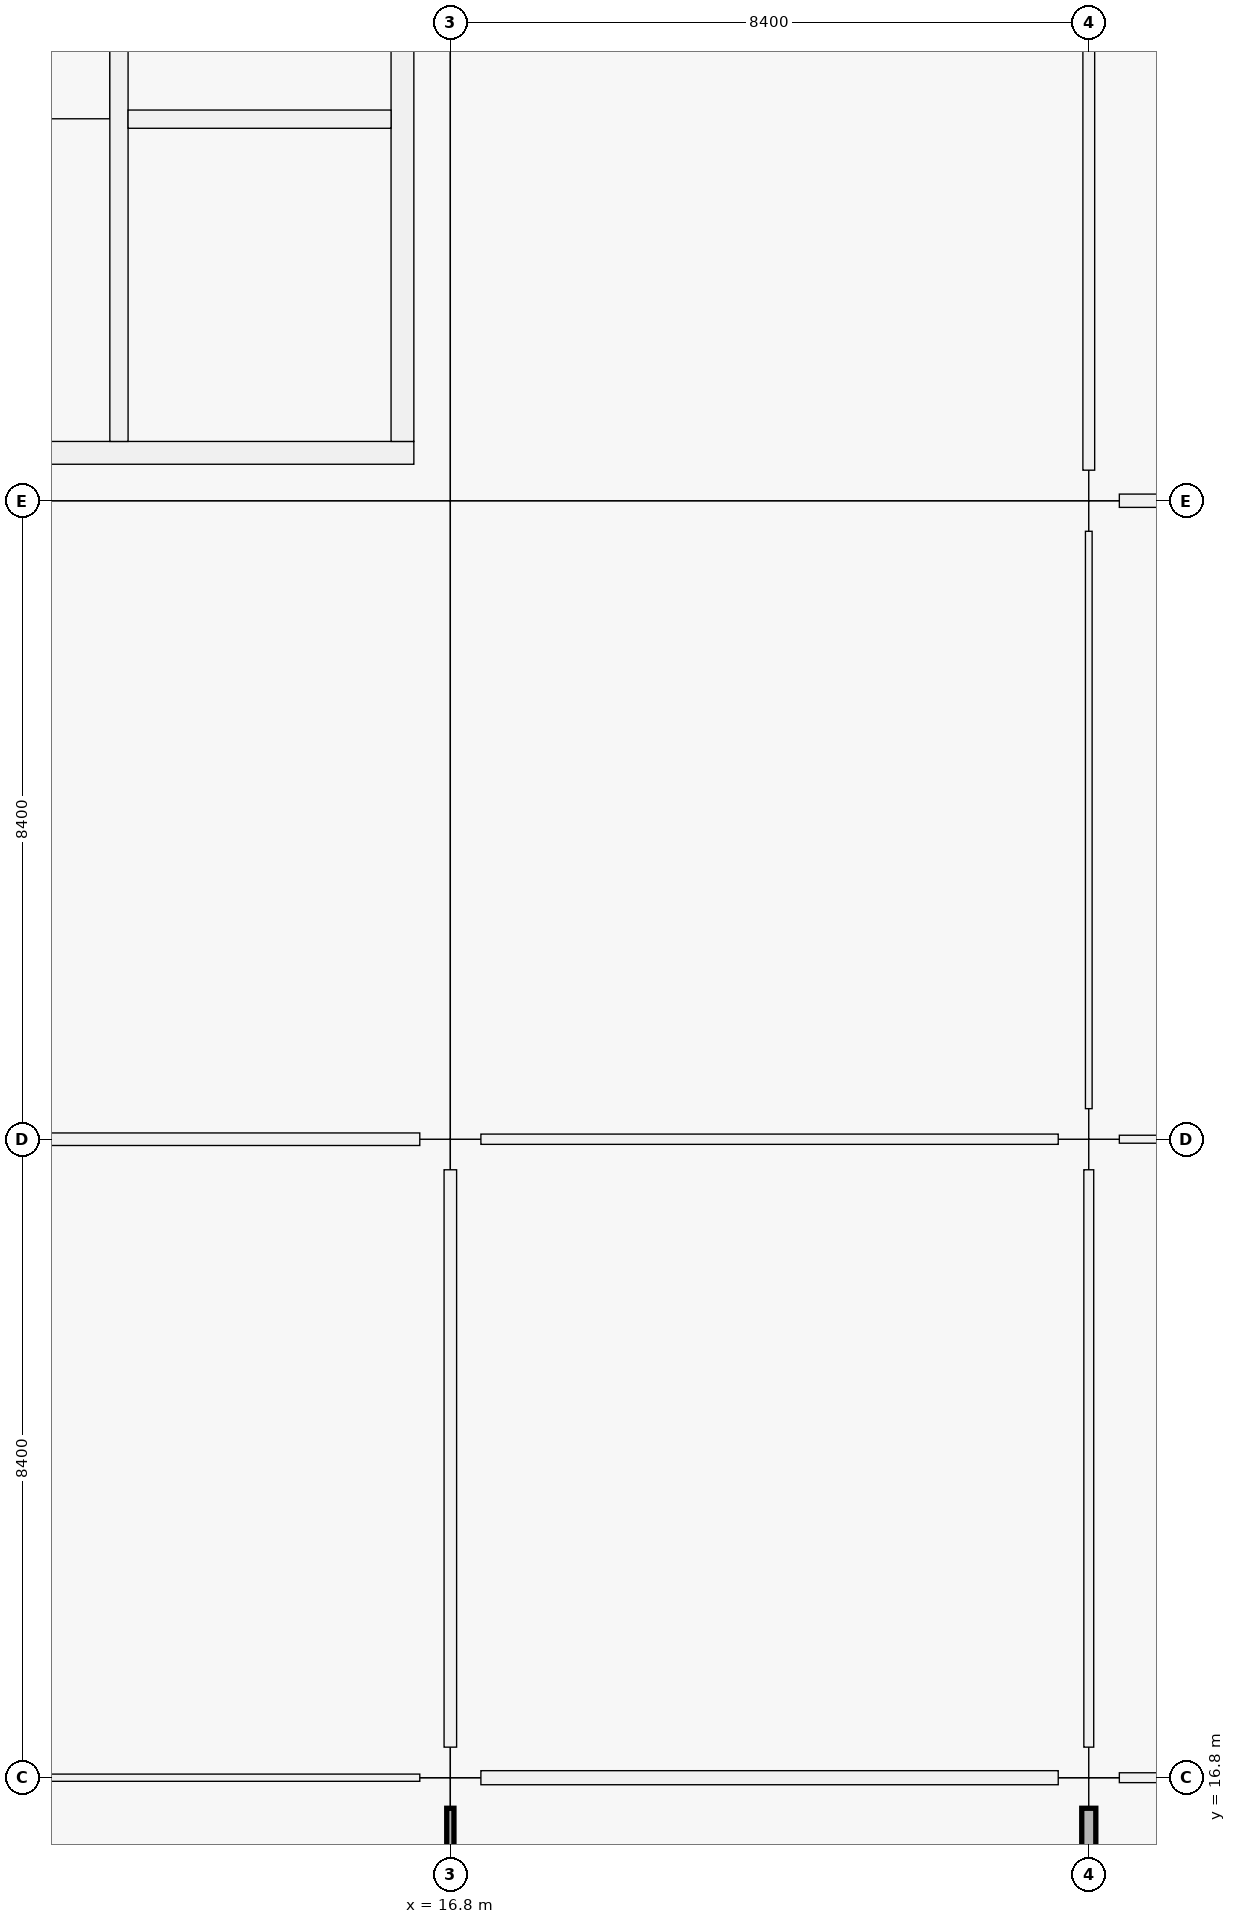
"""IFC4 building model, lengths in metres.
Left out: names, types, materials, properties, quantities, classifications, styles, units other than length and angle.
Written with IfcOpenShell. Run it as: python <this file> out.ifc"""

import sys

from ifc_helpers import new_model, si_unit, direction, frame, frame_2d, origin, origin_2d, place, context, subcontext, project, spatial, rectangle, extrude, element, fill, save


model = new_model("IFC4")
c1 = context("Model", 3, precision=1e-05, world=origin(), true_north=direction((0.0, 1.0)))
c2 = subcontext(c1, "Body", "Model", "MODEL_VIEW")
j1 = project(units=[si_unit("LENGTHUNIT", "METRE"), si_unit("PLANEANGLEUNIT", "RADIAN")], contexts=[c1])
p1 = place(None, origin())
s1 = spatial("IfcSite", under=j1, at=p1, CompositionType="ELEMENT")
p2 = place(p1, origin())
s2 = spatial("IfcBuilding", under=s1, at=p2, CompositionType="ELEMENT")
p3 = place(p2, frame((0.0, 0.0, 5.76)))
s3 = spatial("IfcBuildingStorey", under=s2, at=p3, CompositionType="ELEMENT", Elevation=5.76)
for number, where, z_axis, x_axis in (
    (1, (16.8, 16.8, 0.0), (0.0, 0.0, 1.0), (1.0, 0.0, 0.0)),
    (2, (16.8, 25.2, 0.0), (0.0, 0.0, 1.0), (1.0, 0.0, 0.0)),
    (3, (16.8, 33.6, 0.0), (0.0, 0.0, 1.0), (1.0, 0.0, 0.0)),
    (4, (25.2, 16.8, 0.0), (0.0, 0.0, 1.0), (1.0, 0.0, 0.0)),
    (5, (25.2, 25.2, 0.0), (0.0, 0.0, 1.0), (1.0, 0.0, 0.0)),
    (6, (25.2, 33.6, 0.0), (0.0, 0.0, 1.0), (1.0, 0.0, 0.0)),
):
    element("IfcColumn", number, at=place(p3, frame(where, z_axis=z_axis, x_axis=x_axis)), inside=s3, PredefinedType="COLUMN", context=c2, shape_type="SweptSolid", body=[
        extrude(rectangle(XDim=0.8, YDim=0.8, at=origin_2d()), origin(), (0.0, 0.0, 1.0), 4.5),
    ])
p4 = place(p3, frame((16.32, 34.23, 0.0), z_axis=(0.0, 0.0, 1.0), x_axis=(-1.0, 0.0, 0.0)))
e7 = element("IfcWall", 7, at=p4, inside=s3, PredefinedType="SHEAR", context=c2, shape_type="SweptSolid", body=[
    extrude(rectangle(XDim=7.44, YDim=0.3, at=frame_2d((3.72, 0.0))), origin(), (0.0, 0.0, 1.0), 4.5),
])
p5 = place(p4, frame((1.28, 0.0, 0.0)))
e8 = element("IfcOpeningElement", 8, at=p5, cuts=e7, PredefinedType="OPENING", context=c2, shape_type="SweptSolid", body=[
    extrude(rectangle(XDim=1.5, YDim=2.15, at=frame_2d((0.75, 1.075))), frame((0.0, 0.15, 0.0), z_axis=(0.0, -1.0, 0.0), x_axis=(1.0, 0.0, 0.0)), (0.0, 0.0, 1.0), 0.3),
])
p6 = place(p3, frame((16.17, 41.22, 0.0), z_axis=(0.0, 0.0, 1.0), x_axis=(0.0, -1.0, 0.0)))
e9 = element("IfcWall", 9, at=p6, inside=s3, PredefinedType="SHEAR", context=c2, shape_type="SweptSolid", body=[
    extrude(rectangle(XDim=6.84, YDim=0.3, at=frame_2d((3.42, 0.0))), origin(), (0.0, 0.0, 1.0), 4.5),
])
p7 = place(p3, frame((12.44, 34.38, 0.0), z_axis=(0.0, 0.0, 1.0), x_axis=(0.0, 1.0, 0.0)))
e10 = element("IfcWall", 10, at=p7, inside=s3, PredefinedType="SHEAR", context=c2, shape_type="SweptSolid", body=[
    extrude(rectangle(XDim=6.84, YDim=0.24, at=frame_2d((3.42, 0.0))), origin(), (0.0, 0.0, 1.0), 4.5),
])
p8 = place(p7, frame((0.12, 0.0, 0.0)))
e11 = element("IfcOpeningElement", 11, at=p8, cuts=e10, PredefinedType="OPENING", context=c2, shape_type="SweptSolid", body=[
    extrude(rectangle(XDim=1.0, YDim=2.15, at=frame_2d((0.5, 1.075))), frame((0.0, 0.12, 0.0), z_axis=(0.0, -1.0, 0.0), x_axis=(1.0, 0.0, 0.0)), (0.0, 0.0, 1.0), 0.24),
])
p9 = place(p3, frame((12.56, 38.62, 0.0), z_axis=(0.0, 0.0, 1.0), x_axis=(1.0, 0.0, 0.0)))
e12 = element("IfcWall", 12, at=p9, inside=s3, PredefinedType="SHEAR", context=c2, shape_type="SweptSolid", body=[
    extrude(rectangle(XDim=3.46, YDim=0.24, at=frame_2d((1.73, 0.0))), origin(), (0.0, 0.0, 1.0), 4.5),
])
p10 = place(p9, frame((1.18, 0.0, 0.0)))
e13 = element("IfcOpeningElement", 13, at=p10, cuts=e12, PredefinedType="OPENING", context=c2, shape_type="SweptSolid", body=[
    extrude(rectangle(XDim=1.1, YDim=2.15, at=frame_2d((0.55, 1.075))), frame((0.0, 0.12, 0.0), z_axis=(0.0, -1.0, 0.0), x_axis=(1.0, 0.0, 0.0)), (0.0, 0.0, 1.0), 0.24),
])
p11 = place(p3, frame((8.802, 16.8, 0.0), z_axis=(0.0, 0.0, 1.0), x_axis=(1.0, 0.0, 0.0)))
e14 = element("IfcWall", 14, at=p11, inside=s3, PredefinedType="PARTITIONING", context=c2, shape_type="SweptSolid", body=[
    extrude(rectangle(XDim=7.596, YDim=0.095, at=frame_2d((3.798, 0.0))), origin(), (0.0, 0.0, 1.0), 2.4),
])
p12 = place(p11, frame((3.258, 0.0, 0.0)))
e15 = element("IfcOpeningElement", 15, at=p12, cuts=e14, PredefinedType="OPENING", context=c2, shape_type="SweptSolid", body=[
    extrude(rectangle(XDim=1.08, YDim=2.22, at=frame_2d((0.54, 1.11))), frame((0.0, 0.047, 0.0), z_axis=(0.0, -1.0, 0.0), x_axis=(1.0, 0.0, 0.0)), (0.0, 0.0, 1.0), 0.095),
])
p13 = place(p3, frame((8.802, 25.2, 0.0), z_axis=(0.0, 0.0, 1.0), x_axis=(1.0, 0.0, 0.0)))
e16 = element("IfcWall", 16, at=p13, inside=s3, PredefinedType="PARTITIONING", context=c2, shape_type="SweptSolid", body=[
    extrude(rectangle(XDim=7.596, YDim=0.165, at=frame_2d((3.798, 0.0))), origin(), (0.0, 0.0, 1.0), 2.4),
])
p14 = place(p13, frame((3.318, 0.0, 0.0)))
e17 = element("IfcOpeningElement", 17, at=p14, cuts=e16, PredefinedType="OPENING", context=c2, shape_type="SweptSolid", body=[
    extrude(rectangle(XDim=0.96, YDim=2.18, at=frame_2d((0.48, 1.09))), frame((0.0, 0.083, 0.0), z_axis=(0.0, -1.0, 0.0), x_axis=(1.0, 0.0, 0.0)), (0.0, 0.0, 1.0), 0.165),
])
p15 = place(p3, frame((17.202, 16.8, 0.0), z_axis=(0.0, 0.0, 1.0), x_axis=(1.0, 0.0, 0.0)))
e18 = element("IfcWall", 18, at=p15, inside=s3, PredefinedType="PARTITIONING", context=c2, shape_type="SweptSolid", body=[
    extrude(rectangle(XDim=7.596, YDim=0.185, at=frame_2d((3.798, 0.0))), origin(), (0.0, 0.0, 1.0), 2.4),
])
p16 = place(p15, frame((3.268, 0.0, 0.0)))
e19 = element("IfcOpeningElement", 19, at=p16, cuts=e18, PredefinedType="OPENING", context=c2, shape_type="SweptSolid", body=[
    extrude(rectangle(XDim=1.06, YDim=2.22, at=frame_2d((0.53, 1.11))), frame((0.0, 0.093, 0.0), z_axis=(0.0, -1.0, 0.0), x_axis=(1.0, 0.0, 0.0)), (0.0, 0.0, 1.0), 0.185),
])
p17 = place(p3, frame((17.202, 25.2, 0.0), z_axis=(0.0, 0.0, 1.0), x_axis=(1.0, 0.0, 0.0)))
e20 = element("IfcWall", 20, at=p17, inside=s3, PredefinedType="PARTITIONING", context=c2, shape_type="SweptSolid", body=[
    extrude(rectangle(XDim=7.596, YDim=0.135, at=frame_2d((3.798, 0.0))), origin(), (0.0, 0.0, 1.0), 2.4),
])
p18 = place(p17, frame((3.338, 0.0, 0.0)))
e21 = element("IfcOpeningElement", 21, at=p18, cuts=e20, PredefinedType="OPENING", context=c2, shape_type="SweptSolid", body=[
    extrude(rectangle(XDim=0.92, YDim=2.15, at=frame_2d((0.46, 1.075))), frame((0.0, 0.067, 0.0), z_axis=(0.0, -1.0, 0.0), x_axis=(1.0, 0.0, 0.0)), (0.0, 0.0, 1.0), 0.135),
])
p19 = place(p3, frame((25.602, 16.8, 0.0), z_axis=(0.0, 0.0, 1.0), x_axis=(1.0, 0.0, 0.0)))
e22 = element("IfcWall", 22, at=p19, inside=s3, PredefinedType="MOVABLE", context=c2, shape_type="SweptSolid", body=[
    extrude(rectangle(XDim=7.596, YDim=0.13, at=frame_2d((3.798, 0.0))), origin(), (0.0, 0.0, 1.0), 2.4),
])
p20 = place(p19, frame((3.313, 0.0, 0.0)))
e23 = element("IfcOpeningElement", 23, at=p20, cuts=e22, PredefinedType="OPENING", context=c2, shape_type="SweptSolid", body=[
    extrude(rectangle(XDim=0.97, YDim=2.12, at=frame_2d((0.485, 1.06))), frame((0.0, 0.065, 0.0), z_axis=(0.0, -1.0, 0.0), x_axis=(1.0, 0.0, 0.0)), (0.0, 0.0, 1.0), 0.13),
])
p21 = place(p3, frame((25.602, 25.2, 0.0), z_axis=(0.0, 0.0, 1.0), x_axis=(1.0, 0.0, 0.0)))
e24 = element("IfcWall", 24, at=p21, inside=s3, PredefinedType="PARTITIONING", context=c2, shape_type="SweptSolid", body=[
    extrude(rectangle(XDim=7.596, YDim=0.105, at=frame_2d((3.798, 0.0))), origin(), (0.0, 0.0, 1.0), 2.4),
])
p22 = place(p21, frame((3.278, 0.0, 0.0)))
e25 = element("IfcOpeningElement", 25, at=p22, cuts=e24, PredefinedType="OPENING", context=c2, shape_type="SweptSolid", body=[
    extrude(rectangle(XDim=1.04, YDim=2.2, at=frame_2d((0.52, 1.1))), frame((0.0, 0.052, 0.0), z_axis=(0.0, -1.0, 0.0), x_axis=(1.0, 0.0, 0.0)), (0.0, 0.0, 1.0), 0.105),
])
p23 = place(p3, frame((25.602, 33.6, 0.0), z_axis=(0.0, 0.0, 1.0), x_axis=(1.0, 0.0, 0.0)))
e26 = element("IfcWall", 26, at=p23, inside=s3, PredefinedType="PARTITIONING", context=c2, shape_type="SweptSolid", body=[
    extrude(rectangle(XDim=7.596, YDim=0.175, at=frame_2d((3.798, 0.0))), origin(), (0.0, 0.0, 1.0), 2.4),
])
p24 = place(p23, frame((3.333, 0.0, 0.0)))
e27 = element("IfcOpeningElement", 27, at=p24, cuts=e26, PredefinedType="OPENING", context=c2, shape_type="SweptSolid", body=[
    extrude(rectangle(XDim=0.93, YDim=2.12, at=frame_2d((0.465, 1.06))), frame((0.0, 0.087, 0.0), z_axis=(0.0, -1.0, 0.0), x_axis=(1.0, 0.0, 0.0)), (0.0, 0.0, 1.0), 0.175),
])
p25 = place(p3, frame((16.8, 8.702, 0.0), z_axis=(0.0, 0.0, 1.0), x_axis=(0.0, 1.0, 0.0)))
e28 = element("IfcWall", 28, at=p25, inside=s3, PredefinedType="PARTITIONING", context=c2, shape_type="SweptSolid", body=[
    extrude(rectangle(XDim=7.696, YDim=0.095, at=frame_2d((3.848, 0.0))), origin(), (0.0, 0.0, 1.0), 2.4),
])
p26 = place(p25, frame((3.323, 0.0, 0.0)))
e29 = element("IfcOpeningElement", 29, at=p26, cuts=e28, PredefinedType="OPENING", context=c2, shape_type="SweptSolid", body=[
    extrude(rectangle(XDim=1.05, YDim=2.12, at=frame_2d((0.525, 1.06))), frame((0.0, 0.047, 0.0), z_axis=(0.0, -1.0, 0.0), x_axis=(1.0, 0.0, 0.0)), (0.0, 0.0, 1.0), 0.095),
])
p27 = place(p3, frame((16.8, 17.202, 0.0), z_axis=(0.0, 0.0, 1.0), x_axis=(0.0, 1.0, 0.0)))
e30 = element("IfcWall", 30, at=p27, inside=s3, PredefinedType="PARTITIONING", context=c2, shape_type="SweptSolid", body=[
    extrude(rectangle(XDim=7.596, YDim=0.165, at=frame_2d((3.798, 0.0))), origin(), (0.0, 0.0, 1.0), 2.4),
])
p28 = place(p27, frame((3.293, 0.0, 0.0)))
e31 = element("IfcOpeningElement", 31, at=p28, cuts=e30, PredefinedType="OPENING", context=c2, shape_type="SweptSolid", body=[
    extrude(rectangle(XDim=1.01, YDim=2.12, at=frame_2d((0.505, 1.06))), frame((0.0, 0.083, 0.0), z_axis=(0.0, -1.0, 0.0), x_axis=(1.0, 0.0, 0.0)), (0.0, 0.0, 1.0), 0.165),
])
p29 = place(p3, frame((25.2, 8.727, 0.0), z_axis=(0.0, 0.0, 1.0), x_axis=(0.0, 1.0, 0.0)))
e32 = element("IfcWall", 32, at=p29, inside=s3, PredefinedType="PARTITIONING", context=c2, shape_type="SweptSolid", body=[
    extrude(rectangle(XDim=7.671, YDim=0.185, at=frame_2d((3.835, 0.0))), origin(), (0.0, 0.0, 1.0), 2.4),
])
p30 = place(p29, frame((3.306, 0.0, 0.0)))
e33 = element("IfcOpeningElement", 33, at=p30, cuts=e32, PredefinedType="OPENING", context=c2, shape_type="SweptSolid", body=[
    extrude(rectangle(XDim=1.06, YDim=2.22, at=frame_2d((0.53, 1.11))), frame((0.0, 0.093, 0.0), z_axis=(0.0, -1.0, 0.0), x_axis=(1.0, 0.0, 0.0)), (0.0, 0.0, 1.0), 0.185),
])
p31 = place(p3, frame((25.2, 17.202, 0.0), z_axis=(0.0, 0.0, 1.0), x_axis=(0.0, 1.0, 0.0)))
e34 = element("IfcWall", 34, at=p31, inside=s3, PredefinedType="MOVABLE", context=c2, shape_type="SweptSolid", body=[
    extrude(rectangle(XDim=7.596, YDim=0.13, at=frame_2d((3.798, 0.0))), origin(), (0.0, 0.0, 1.0), 2.4),
])
p32 = place(p31, frame((3.278, 0.0, 0.0)))
e35 = element("IfcOpeningElement", 35, at=p32, cuts=e34, PredefinedType="OPENING", context=c2, shape_type="SweptSolid", body=[
    extrude(rectangle(XDim=1.04, YDim=2.2, at=frame_2d((0.52, 1.1))), frame((0.0, 0.065, 0.0), z_axis=(0.0, -1.0, 0.0), x_axis=(1.0, 0.0, 0.0)), (0.0, 0.0, 1.0), 0.13),
])
p33 = place(p3, frame((25.2, 25.602, 0.0), z_axis=(0.0, 0.0, 1.0), x_axis=(0.0, 1.0, 0.0)))
e36 = element("IfcWall", 36, at=p33, inside=s3, PredefinedType="PARTITIONING", context=c2, shape_type="SweptSolid", body=[
    extrude(rectangle(XDim=7.596, YDim=0.088, at=frame_2d((3.798, 0.0))), origin(), (0.0, 0.0, 1.0), 2.4),
])
p34 = place(p33, frame((3.268, 0.0, 0.0)))
e37 = element("IfcOpeningElement", 37, at=p34, cuts=e36, PredefinedType="OPENING", context=c2, shape_type="SweptSolid", body=[
    extrude(rectangle(XDim=1.06, YDim=2.22, at=frame_2d((0.53, 1.11))), frame((0.0, 0.044, 0.0), z_axis=(0.0, -1.0, 0.0), x_axis=(1.0, 0.0, 0.0)), (0.0, 0.0, 1.0), 0.088),
])
p35 = place(p3, frame((25.2, 34.002, 0.0), z_axis=(0.0, 0.0, 1.0), x_axis=(0.0, 1.0, 0.0)))
e38 = element("IfcWall", 38, at=p35, inside=s3, PredefinedType="PARTITIONING", context=c2, shape_type="SweptSolid", body=[
    extrude(rectangle(XDim=7.596, YDim=0.155, at=frame_2d((3.798, 0.0))), origin(), (0.0, 0.0, 1.0), 2.4),
])
p36 = place(p35, frame((3.278, 0.0, 0.0)))
e39 = element("IfcOpeningElement", 39, at=p36, cuts=e38, PredefinedType="OPENING", context=c2, shape_type="SweptSolid", body=[
    extrude(rectangle(XDim=1.04, YDim=2.2, at=frame_2d((0.52, 1.1))), frame((0.0, 0.078, 0.0), z_axis=(0.0, -1.0, 0.0), x_axis=(1.0, 0.0, 0.0)), (0.0, 0.0, 1.0), 0.155),
])
p37 = place(p8, origin())
e40 = element("IfcDoor", 40, at=p37, inside=s3, OperationType="SINGLE_SWING_RIGHT", PredefinedType="DOOR", context=c2, shape_type="SweptSolid", body=[
    extrude(rectangle(XDim=1.0, YDim=2.15, at=frame_2d((0.5, 1.075))), frame((0.0, 0.025, 0.0), z_axis=(0.0, -1.0, 0.0), x_axis=(1.0, 0.0, 0.0)), (0.0, 0.0, 1.0), 0.05),
])
fill(e11, e40)
p38 = place(p5, origin())
e41 = element("IfcDoor", 41, at=p38, inside=s3, OperationType="DOUBLE_DOOR_SINGLE_SWING", PredefinedType="DOOR", context=c2, shape_type="SweptSolid", body=[
    extrude(rectangle(XDim=1.5, YDim=2.15, at=frame_2d((0.75, 1.075))), frame((0.0, 0.025, 0.0), z_axis=(0.0, -1.0, 0.0), x_axis=(1.0, 0.0, 0.0)), (0.0, 0.0, 1.0), 0.05),
])
fill(e8, e41)
p39 = place(p10, origin())
e42 = element("IfcDoor", 42, at=p39, inside=s3, OperationType="DOUBLE_DOOR_SLIDING", PredefinedType="DOOR", context=c2, shape_type="SweptSolid", body=[
    extrude(rectangle(XDim=1.1, YDim=2.15, at=frame_2d((0.55, 1.075))), frame((0.0, 0.025, 0.0), z_axis=(0.0, -1.0, 0.0), x_axis=(1.0, 0.0, 0.0)), (0.0, 0.0, 1.0), 0.05),
])
fill(e13, e42)
p40 = place(p14, origin())
e43 = element("IfcDoor", 43, at=p40, inside=s3, OperationType="SINGLE_SWING_RIGHT", PredefinedType="DOOR", context=c2, shape_type="SweptSolid", body=[
    extrude(rectangle(XDim=0.96, YDim=2.18, at=frame_2d((0.48, 1.09))), frame((0.0, 0.025, 0.0), z_axis=(0.0, -1.0, 0.0), x_axis=(1.0, 0.0, 0.0)), (0.0, 0.0, 1.0), 0.05),
])
fill(e17, e43)
p41 = place(p18, origin())
e44 = element("IfcDoor", 44, at=p41, inside=s3, OperationType="SINGLE_SWING_RIGHT", PredefinedType="DOOR", context=c2, shape_type="SweptSolid", body=[
    extrude(rectangle(XDim=0.92, YDim=2.15, at=frame_2d((0.46, 1.075))), frame((0.0, 0.025, 0.0), z_axis=(0.0, -1.0, 0.0), x_axis=(1.0, 0.0, 0.0)), (0.0, 0.0, 1.0), 0.05),
])
fill(e21, e44)
p42 = place(p34, origin())
e45 = element("IfcDoor", 45, at=p42, inside=s3, OperationType="SINGLE_SWING_LEFT", PredefinedType="DOOR", context=c2, shape_type="SweptSolid", body=[
    extrude(rectangle(XDim=1.06, YDim=2.22, at=frame_2d((0.53, 1.11))), frame((0.0, 0.025, 0.0), z_axis=(0.0, -1.0, 0.0), x_axis=(1.0, 0.0, 0.0)), (0.0, 0.0, 1.0), 0.05),
])
fill(e37, e45)
p43 = place(p36, origin())
e46 = element("IfcDoor", 46, at=p43, inside=s3, OperationType="SINGLE_SWING_RIGHT", PredefinedType="DOOR", context=c2, shape_type="SweptSolid", body=[
    extrude(rectangle(XDim=1.04, YDim=2.2, at=frame_2d((0.52, 1.1))), frame((0.0, 0.025, 0.0), z_axis=(0.0, -1.0, 0.0), x_axis=(1.0, 0.0, 0.0)), (0.0, 0.0, 1.0), 0.05),
])
fill(e39, e46)
p44 = place(p12, origin())
e47 = element("IfcDoor", 47, at=p44, inside=s3, OperationType="SINGLE_SWING_RIGHT", PredefinedType="DOOR", context=c2, shape_type="SweptSolid", body=[
    extrude(rectangle(XDim=1.08, YDim=2.22, at=frame_2d((0.54, 1.11))), frame((0.0, 0.025, 0.0), z_axis=(0.0, -1.0, 0.0), x_axis=(1.0, 0.0, 0.0)), (0.0, 0.0, 1.0), 0.05),
])
fill(e15, e47)
p45 = place(p16, origin())
e48 = element("IfcDoor", 48, at=p45, inside=s3, OperationType="SINGLE_SWING_LEFT", PredefinedType="DOOR", context=c2, shape_type="SweptSolid", body=[
    extrude(rectangle(XDim=1.06, YDim=2.22, at=frame_2d((0.53, 1.11))), frame((0.0, 0.025, 0.0), z_axis=(0.0, -1.0, 0.0), x_axis=(1.0, 0.0, 0.0)), (0.0, 0.0, 1.0), 0.05),
])
fill(e19, e48)
p46 = place(p28, origin())
e49 = element("IfcDoor", 49, at=p46, inside=s3, OperationType="SINGLE_SWING_LEFT", PredefinedType="DOOR", context=c2, shape_type="SweptSolid", body=[
    extrude(rectangle(XDim=1.01, YDim=2.12, at=frame_2d((0.505, 1.06))), frame((0.0, 0.025, 0.0), z_axis=(0.0, -1.0, 0.0), x_axis=(1.0, 0.0, 0.0)), (0.0, 0.0, 1.0), 0.05),
])
fill(e31, e49)
p47 = place(p32, origin())
e50 = element("IfcDoor", 50, at=p47, inside=s3, OperationType="SINGLE_SWING_RIGHT", PredefinedType="DOOR", context=c2, shape_type="SweptSolid", body=[
    extrude(rectangle(XDim=1.04, YDim=2.2, at=frame_2d((0.52, 1.1))), frame((0.0, 0.025, 0.0), z_axis=(0.0, -1.0, 0.0), x_axis=(1.0, 0.0, 0.0)), (0.0, 0.0, 1.0), 0.05),
])
fill(e35, e50)
save(model, sys.argv[1])
